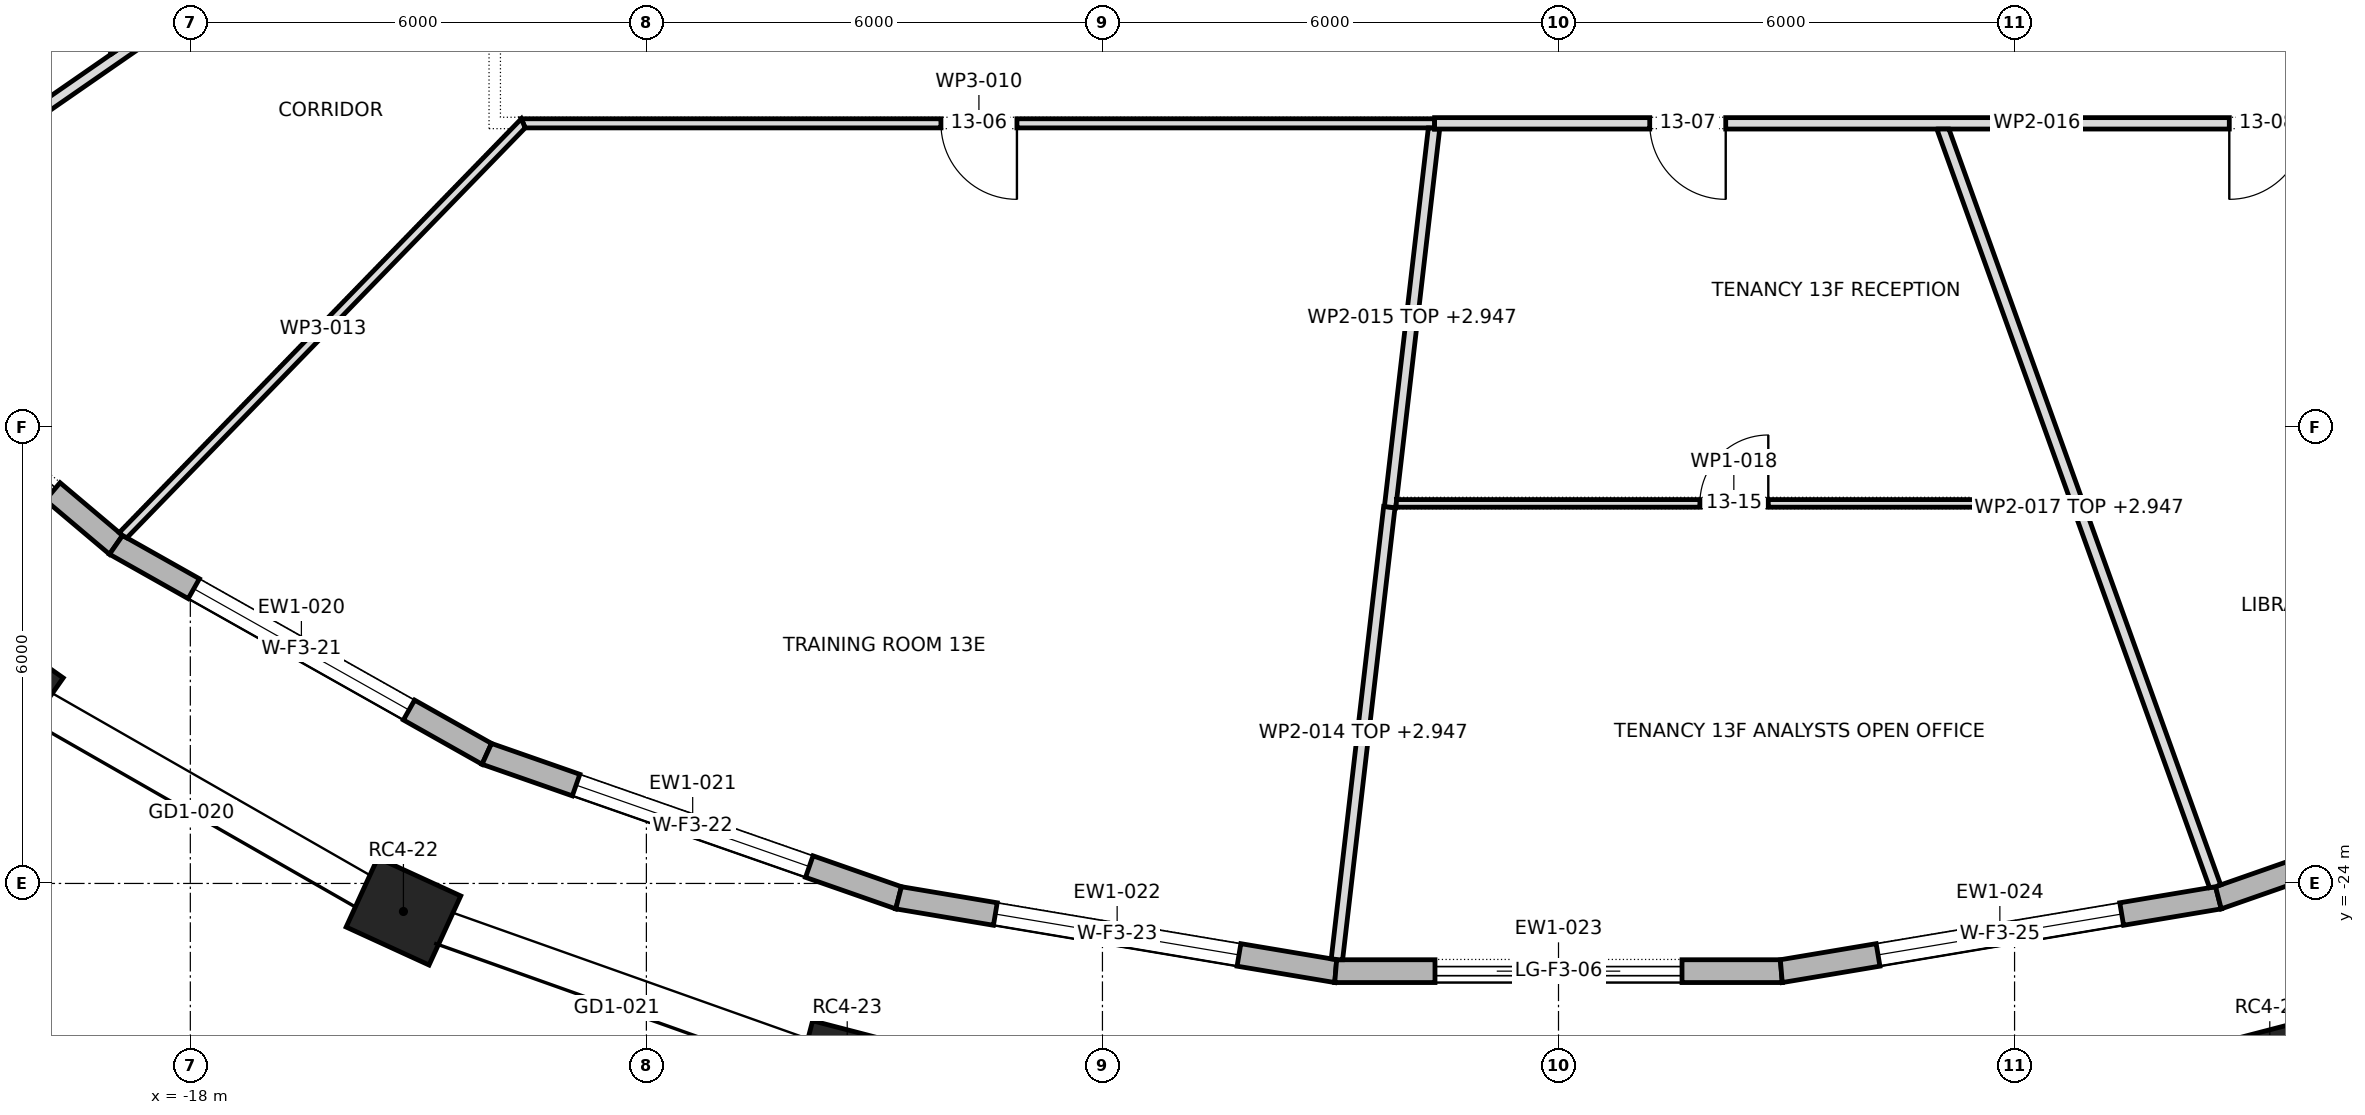
"""IFC4 building model, lengths in metres.
Left out: names, types, materials, properties, quantities, classifications, styles, units other than length and angle.
Written with IfcOpenShell. Run it as: python <this file> out.ifc"""

import sys

from ifc_helpers import new_model, si_unit, direction, frame, frame_2d, origin, origin_2d, place, context, subcontext, project, spatial, polyline, rectangle, outline, extrude, element, fill, save


model = new_model("IFC4")
c1 = context("Model", 3, precision=1e-05, world=origin(), true_north=direction((0.0, 1.0)))
c2 = subcontext(c1, "Body", "Model", "MODEL_VIEW")
j1 = project(units=[si_unit("LENGTHUNIT", "METRE"), si_unit("PLANEANGLEUNIT", "RADIAN")], contexts=[c1])
p1 = place(None, origin())
s1 = spatial("IfcSite", under=j1, at=p1, CompositionType="ELEMENT")
p2 = place(p1, origin())
s2 = spatial("IfcBuilding", under=s1, at=p2, CompositionType="ELEMENT")
p3 = place(p2, frame((0.0, 0.0, 198.9)))
s3 = spatial("IfcBuildingStorey", under=s2, at=p3, CompositionType="ELEMENT", Elevation=198.9)
for number, where, z_axis, x_axis in (
    (1, (-20.451, -21.359, 0.0), (0.0, 0.0, 1.0), (0.818, -0.575, 0.0)),
    (2, (-15.196, -24.369, 0.0), (0.0, 0.0, 1.0), (0.909, -0.417, 0.0)),
    (3, (-9.358, -26.442, 0.0), (0.0, 0.0, 1.0), (0.968, -0.252, 0.0)),
    (4, (9.358, -26.442, 0.0), (0.0, 0.0, 1.0), (0.968, 0.252, 0.0)),
):
    element("IfcColumn", number, at=place(p3, frame(where, z_axis=z_axis, x_axis=x_axis)), inside=s3, PredefinedType="COLUMN", context=c2, shape_type="SweptSolid", body=[
        extrude(rectangle(XDim=1.2, YDim=1.0, at=origin_2d()), origin(), (0.0, 0.0, 1.0), 4.0),
    ])
p4 = place(p3, frame((-23.128, -16.044, 0.0), z_axis=(0.0, 0.0, 1.0), x_axis=(0.764330261608, -0.644824977176, 0.0)))
e5 = element("IfcWall", 5, at=p4, inside=s3, PredefinedType="STANDARD", context=c2, shape_type="SweptSolid", body=[
    extrude(outline(polyline([(-0.015, -0.15), (5.444, -0.15), (5.416, 0.15), (0.015, 0.15), (-0.015, -0.15)])), origin(), (0.0, 0.0, 1.0), 3.7),
])
p5 = place(p4, frame((1.09, 0.0, 0.0)))
e6 = element("IfcOpeningElement", 6, at=p5, cuts=e5, PredefinedType="OPENING", context=c2, shape_type="SweptSolid", body=[
    extrude(rectangle(XDim=3.25, YDim=3.25, at=frame_2d((1.625, 1.625))), frame((0.0, 0.162, 0.0), z_axis=(0.0, -1.0, 0.0), x_axis=(1.0, 0.0, 0.0)), (0.0, 0.0, 1.0), 0.324),
])
p6 = place(p3, frame((-18.977, -19.545, 0.0), z_axis=(0.0, 0.0, 1.0), x_axis=(0.871083701819, -0.491134588912, 0.0)))
e7 = element("IfcWall", 7, at=p6, inside=s3, PredefinedType="STANDARD", context=c2, shape_type="SweptSolid", body=[
    extrude(outline(polyline([(-0.014, -0.15), (5.613, -0.15), (5.586, 0.15), (0.014, 0.15), (-0.014, -0.15)])), origin(), (0.0, 0.0, 1.0), 3.7),
])
p7 = place(p6, frame((1.175, 0.0, 0.6)))
e8 = element("IfcOpeningElement", 8, at=p7, cuts=e7, PredefinedType="OPENING", context=c2, shape_type="SweptSolid", body=[
    extrude(rectangle(XDim=3.25, YDim=2.65, at=frame_2d((1.625, 1.325))), frame((0.0, 0.162, 0.0), z_axis=(0.0, -1.0, 0.0), x_axis=(1.0, 0.0, 0.0)), (0.0, 0.0, 1.0), 0.324),
])
p8 = place(p3, frame((-14.1, -22.295, 0.0), z_axis=(0.0, 0.0, 1.0), x_axis=(0.944020060936, -0.329888048511, 0.0)))
e9 = element("IfcWall", 9, at=p8, inside=s3, PredefinedType="STANDARD", context=c2, shape_type="SweptSolid", body=[
    extrude(outline(polyline([(-0.013, -0.15), (5.752, -0.15), (5.727, 0.15), (0.013, 0.15), (-0.013, -0.15)])), origin(), (0.0, 0.0, 1.0), 3.7),
])
p9 = place(p8, frame((1.245, 0.0, 0.6)))
e10 = element("IfcOpeningElement", 10, at=p9, cuts=e9, PredefinedType="OPENING", context=c2, shape_type="SweptSolid", body=[
    extrude(rectangle(XDim=3.25, YDim=2.65, at=frame_2d((1.625, 1.325))), frame((0.0, 0.162, 0.0), z_axis=(0.0, -1.0, 0.0), x_axis=(1.0, 0.0, 0.0)), (0.0, 0.0, 1.0), 0.324),
])
p10 = place(p3, frame((-8.682, -24.189, 0.0), z_axis=(0.0, 0.0, 1.0), x_axis=(0.986207709048, -0.165512400181, 0.0)))
e11 = element("IfcWall", 11, at=p10, inside=s3, PredefinedType="STANDARD", context=c2, shape_type="SweptSolid", body=[
    extrude(outline(polyline([(-0.013, -0.15), (5.843, -0.15), (5.818, 0.15), (0.013, 0.15), (-0.013, -0.15)])), origin(), (0.0, 0.0, 1.0), 3.7),
])
p11 = place(p10, frame((1.291, 0.0, 0.6)))
e12 = element("IfcOpeningElement", 12, at=p11, cuts=e11, PredefinedType="OPENING", context=c2, shape_type="SweptSolid", body=[
    extrude(rectangle(XDim=3.25, YDim=2.65, at=frame_2d((1.625, 1.325))), frame((0.0, 0.162, 0.0), z_axis=(0.0, -1.0, 0.0), x_axis=(1.0, 0.0, 0.0)), (0.0, 0.0, 1.0), 0.324),
])
p12 = place(p3, frame((-2.931, -25.154, 0.0), z_axis=(0.0, 0.0, 1.0), x_axis=(1.0, 0.0, 0.0)))
e13 = element("IfcWall", 13, at=p12, inside=s3, PredefinedType="STANDARD", context=c2, shape_type="SweptSolid", body=[
    extrude(outline(polyline([(-0.012, -0.15), (5.875, -0.15), (5.85, 0.15), (0.012, 0.15), (-0.012, -0.15)])), origin(), (0.0, 0.0, 1.0), 3.7),
])
p13 = place(p12, frame((1.306, 0.0, 0.0)))
e14 = element("IfcOpeningElement", 14, at=p13, cuts=e13, PredefinedType="OPENING", context=c2, shape_type="SweptSolid", body=[
    extrude(rectangle(XDim=3.25, YDim=3.25, at=frame_2d((1.625, 1.625))), frame((0.0, 0.162, 0.0), z_axis=(0.0, -1.0, 0.0), x_axis=(1.0, 0.0, 0.0)), (0.0, 0.0, 1.0), 0.324),
])
p14 = place(p3, frame((2.931, -25.154, 0.0), z_axis=(0.0, 0.0, 1.0), x_axis=(0.986207709048, 0.165512400181, 0.0)))
e15 = element("IfcWall", 15, at=p14, inside=s3, PredefinedType="STANDARD", context=c2, shape_type="SweptSolid", body=[
    extrude(outline(polyline([(-0.012, -0.15), (5.844, -0.15), (5.818, 0.15), (0.012, 0.15), (-0.012, -0.15)])), origin(), (0.0, 0.0, 1.0), 3.7),
])
p15 = place(p14, frame((1.291, 0.0, 0.6)))
e16 = element("IfcOpeningElement", 16, at=p15, cuts=e15, PredefinedType="OPENING", context=c2, shape_type="SweptSolid", body=[
    extrude(rectangle(XDim=3.25, YDim=2.65, at=frame_2d((1.625, 1.325))), frame((0.0, 0.162, 0.0), z_axis=(0.0, -1.0, 0.0), x_axis=(1.0, 0.0, 0.0)), (0.0, 0.0, 1.0), 0.324),
])
p16 = place(p3, frame((8.682, -24.189, 0.0), z_axis=(0.0, 0.0, 1.0), x_axis=(0.944020060936, 0.329888048511, 0.0)))
e17 = element("IfcWall", 17, at=p16, inside=s3, PredefinedType="STANDARD", context=c2, shape_type="SweptSolid", body=[
    extrude(outline(polyline([(-0.013, -0.15), (5.753, -0.15), (5.726, 0.15), (0.013, 0.15), (-0.013, -0.15)])), origin(), (0.0, 0.0, 1.0), 3.7),
])
p17 = place(p16, frame((1.245, 0.0, 0.6)))
e18 = element("IfcOpeningElement", 18, at=p17, cuts=e17, PredefinedType="OPENING", context=c2, shape_type="SweptSolid", body=[
    extrude(rectangle(XDim=3.25, YDim=2.65, at=frame_2d((1.625, 1.325))), frame((0.0, 0.162, 0.0), z_axis=(0.0, -1.0, 0.0), x_axis=(1.0, 0.0, 0.0)), (0.0, 0.0, 1.0), 0.324),
])
p18 = place(p3, frame((-23.024, -15.94, 0.0), z_axis=(0.0, 0.0, 1.0), x_axis=(0.822097241007, 0.569347105313, 0.0)))
e19 = element("IfcWall", 19, at=p18, inside=s3, PredefinedType="PARTITIONING", context=c2, shape_type="SweptSolid", body=[
    extrude(outline(polyline([(0.024, -0.075), (1.856, -0.075), (3.688, -0.075), (5.52, -0.075), (7.352, -0.075), (9.184, -0.075), (11.016, -0.075), (10.977, -0.0), (10.938, 0.075), (8.961, 0.075), (6.985, 0.075), (5.008, 0.075), (5.006, 0.072), (5.002, 0.075), (3.335, 0.075), (1.667, 0.075), (0.0, 0.075), (0.0, 0.068), (0.005, -0.002), (0.024, -0.075)])), origin(), (0.0, 0.0, 1.0), 2.947),
])
p19 = place(p3, frame((-19.0, -13.095, 0.0), z_axis=(0.0, 0.0, 1.0), x_axis=(0.0, 1.0, 0.0)))
e20 = element("IfcWall", 20, at=p19, inside=s3, PredefinedType="PARTITIONING", context=c2, shape_type="SweptSolid", body=[
    extrude(outline(polyline([(8.169, -0.05), (8.169, -0.049), (8.144, 0.05), (6.515, 0.05), (4.886, 0.05), (3.258, 0.05), (1.629, 0.05), (0.0, 0.05), (0.0, 0.049), (0.069, -0.05), (1.689, -0.05), (3.309, -0.05), (4.929, -0.05), (6.549, -0.05), (8.169, -0.05)])), origin(), (0.0, 0.0, 1.0), 3.7),
])
p20 = place(p19, frame((3.64, 0.0, 0.0)))
e21 = element("IfcOpeningElement", 21, at=p20, cuts=e20, PredefinedType="OPENING", context=c2, shape_type="SweptSolid", body=[
    extrude(rectangle(XDim=0.9, YDim=2.1, at=frame_2d((0.45, 1.05))), frame((0.0, 0.062, 0.0), z_axis=(0.0, -1.0, 0.0), x_axis=(1.0, 0.0, 0.0)), (0.0, 0.0, 1.0), 0.124),
])
p21 = place(p3, frame((-13.646, -14.0, 0.0), z_axis=(0.0, 0.0, 1.0), x_axis=(1.0, 0.0, 0.0)))
e22 = element("IfcWall", 22, at=p21, inside=s3, PredefinedType="PARTITIONING", context=c2, shape_type="SweptSolid", body=[
    extrude(outline(polyline([(12.016, 0.06), (10.299, 0.06), (8.583, 0.06), (6.866, 0.06), (5.15, 0.06), (3.433, 0.06), (1.717, 0.06), (0.0, 0.06), (0.051, -0.06), (2.045, -0.06), (4.039, -0.06), (6.033, -0.06), (8.027, -0.06), (10.021, -0.06), (12.016, -0.06), (12.016, 0.06)])), origin(), (0.0, 0.0, 1.0), 3.7),
])
p22 = place(p21, frame((5.521, 0.0, 0.0)))
e23 = element("IfcOpeningElement", 23, at=p22, cuts=e22, PredefinedType="OPENING", context=c2, shape_type="SweptSolid", body=[
    extrude(rectangle(XDim=1.0, YDim=2.1, at=frame_2d((0.5, 1.05))), frame((0.0, 0.072, 0.0), z_axis=(0.0, -1.0, 0.0), x_axis=(1.0, 0.0, 0.0)), (0.0, 0.0, 1.0), 0.144),
])
p23 = place(p3, frame((-13.602, -13.982, 0.0), z_axis=(0.0, 0.0, 1.0), x_axis=(-0.69685470262, -0.717212328001, 0.0)))
e24 = element("IfcWall", 24, at=p23, inside=s3, PredefinedType="PARTITIONING", context=c2, shape_type="SweptSolid", body=[
    extrude(outline(polyline([(7.591, -0.06), (7.591, -0.058), (7.587, -0.003), (7.571, 0.06), (5.691, 0.06), (3.811, 0.06), (1.931, 0.06), (0.051, 0.06), (0.025, 0.0), (0.0, -0.06), (0.0, -0.06), (0.0, -0.06), (1.898, -0.06), (3.796, -0.06), (5.694, -0.06), (7.591, -0.06)])), origin(), (0.0, 0.0, 1.0), 3.7),
])
p24 = place(p3, frame((-2.915, -25.0, 0.0), z_axis=(0.0, 0.0, 1.0), x_axis=(0.115112831027, 0.993352422926, 0.0)))
e25 = element("IfcWall", 25, at=p24, inside=s3, PredefinedType="PARTITIONING", context=c2, shape_type="SweptSolid", body=[
    extrude(outline(polyline([(0.0, 0.075), (0.0, -0.031), (0.005, -0.075), (2.0, -0.075), (3.996, -0.075), (5.991, -0.075), (5.991, 0.075), (3.994, 0.075), (1.997, 0.075), (0.0, 0.075)])), origin(), (0.0, 0.0, 1.0), 2.947),
])
p25 = place(p3, frame((-2.216, -19.05, 0.0), z_axis=(0.0, 0.0, 1.0), x_axis=(0.11524289965, 0.993337341531, 0.0)))
e26 = element("IfcWall", 26, at=p25, inside=s3, PredefinedType="PARTITIONING", context=c2, shape_type="SweptSolid", body=[
    extrude(outline(polyline([(0.0, -0.075), (0.099, -0.075), (0.109, -0.074), (0.109, -0.075), (1.745, -0.075), (3.381, -0.075), (5.017, -0.075), (5.017, -0.073), (5.009, -0.009), (5.017, -0.008), (5.017, 0.058), (5.015, 0.075), (3.343, 0.075), (1.672, 0.075), (0.0, 0.075), (0.0, -0.065), (0.0, -0.065), (0.0, -0.075)])), origin(), (0.0, 0.0, 1.0), 2.947),
])
p26 = place(p3, frame((-1.63, -14.0, 0.0), z_axis=(0.0, 0.0, 1.0), x_axis=(1.0, 0.0, 0.0)))
e27 = element("IfcWall", 27, at=p26, inside=s3, PredefinedType="PARTITIONING", context=c2, shape_type="SweptSolid", body=[
    extrude(outline(polyline([(0.0, -0.075), (1.902, -0.075), (3.804, -0.075), (5.707, -0.075), (7.609, -0.075), (9.511, -0.075), (11.414, -0.075), (13.316, -0.075), (15.218, -0.075), (15.281, 0.075), (15.281, 0.075), (13.371, 0.075), (11.461, 0.075), (9.551, 0.075), (7.641, 0.075), (5.73, 0.075), (3.82, 0.075), (1.91, 0.075), (0.0, 0.075), (0.0, -0.075)])), origin(), (0.0, 0.0, 1.0), 3.7),
])
p27 = place(p26, frame((2.83, 0.0, 0.0)))
e28 = element("IfcOpeningElement", 28, at=p27, cuts=e27, PredefinedType="OPENING", context=c2, shape_type="SweptSolid", body=[
    extrude(rectangle(XDim=1.0, YDim=2.1, at=frame_2d((0.5, 1.05))), frame((0.0, 0.087, 0.0), z_axis=(0.0, -1.0, 0.0), x_axis=(1.0, 0.0, 0.0)), (0.0, 0.0, 1.0), 0.174),
])
p28 = place(p26, frame((10.455, 0.0, 0.0)))
e29 = element("IfcOpeningElement", 29, at=p28, cuts=e27, PredefinedType="OPENING", context=c2, shape_type="SweptSolid", body=[
    extrude(rectangle(XDim=1.0, YDim=2.1, at=frame_2d((0.5, 1.05))), frame((0.0, 0.087, 0.0), z_axis=(0.0, -1.0, 0.0), x_axis=(1.0, 0.0, 0.0)), (0.0, 0.0, 1.0), 0.174),
])
p29 = place(p3, frame((5.048, -14.05, 0.0), z_axis=(0.0, 0.0, 1.0), x_axis=(0.338318960249, -0.941031498482, 0.0)))
e30 = element("IfcWall", 30, at=p29, inside=s3, PredefinedType="PARTITIONING", context=c2, shape_type="SweptSolid", body=[
    extrude(outline(polyline([(0.0, -0.075), (1.727, -0.075), (3.454, -0.075), (5.18, -0.075), (5.181, -0.073), (5.188, -0.075), (6.994, -0.075), (8.8, -0.075), (10.606, -0.075), (10.621, 0.004), (10.621, 0.032), (10.621, 0.075), (8.86, 0.075), (7.098, 0.075), (5.337, 0.075), (3.576, 0.075), (1.815, 0.075), (0.054, 0.075), (0.0, -0.074), (0.0, -0.075)])), origin(), (0.0, 0.0, 1.0), 2.947),
])
p30 = place(p3, frame((6.765, -19.0, 0.0), z_axis=(0.0, 0.0, 1.0), x_axis=(-1.0, 0.0, 0.0)))
e31 = element("IfcWall", 31, at=p30, inside=s3, PredefinedType="PARTITIONING", context=c2, shape_type="SweptSolid", body=[
    extrude(outline(polyline([(0.035, -0.05), (1.807, -0.05), (3.579, -0.05), (5.351, -0.05), (7.122, -0.05), (8.894, -0.05), (8.905, 0.046), (8.905, 0.05), (7.124, 0.05), (5.343, 0.05), (3.562, 0.05), (1.781, 0.05), (0.0, 0.05), (0.0, 0.049), (0.035, -0.05)])), origin(), (0.0, 0.0, 1.0), 3.7),
])
p31 = place(p30, frame((4.006, 0.0, 0.0)))
e32 = element("IfcOpeningElement", 32, at=p31, cuts=e31, PredefinedType="OPENING", context=c2, shape_type="SweptSolid", body=[
    extrude(rectangle(XDim=0.9, YDim=2.1, at=frame_2d((0.45, 1.05))), frame((0.0, 0.062, 0.0), z_axis=(0.0, -1.0, 0.0), x_axis=(1.0, 0.0, 0.0)), (0.0, 0.0, 1.0), 0.124),
])
p32 = place(p5, origin())
e33 = element("IfcDoor", 33, at=p32, inside=s3, OperationType="DOUBLE_DOOR_SLIDING", PredefinedType="DOOR", context=c2, shape_type="SweptSolid", body=[
    extrude(rectangle(XDim=3.25, YDim=3.25, at=frame_2d((1.625, 1.625))), frame((0.0, 0.025, 0.0), z_axis=(0.0, -1.0, 0.0), x_axis=(1.0, 0.0, 0.0)), (0.0, 0.0, 1.0), 0.05),
])
fill(e6, e33)
p33 = place(p7, origin())
e34 = element("IfcWindow", 34, at=p33, inside=s3, PartitioningType="TRIPLE_PANEL_VERTICAL", PredefinedType="WINDOW", context=c2, shape_type="SweptSolid", body=[
    extrude(rectangle(XDim=3.25, YDim=2.65, at=frame_2d((1.625, 1.325))), frame((0.0, 0.03, 0.0), z_axis=(0.0, -1.0, 0.0), x_axis=(1.0, 0.0, 0.0)), (0.0, 0.0, 1.0), 0.06),
])
fill(e8, e34)
p34 = place(p9, origin())
e35 = element("IfcWindow", 35, at=p34, inside=s3, PartitioningType="TRIPLE_PANEL_VERTICAL", PredefinedType="WINDOW", context=c2, shape_type="SweptSolid", body=[
    extrude(rectangle(XDim=3.25, YDim=2.65, at=frame_2d((1.625, 1.325))), frame((0.0, 0.03, 0.0), z_axis=(0.0, -1.0, 0.0), x_axis=(1.0, 0.0, 0.0)), (0.0, 0.0, 1.0), 0.06),
])
fill(e10, e35)
p35 = place(p11, origin())
e36 = element("IfcWindow", 36, at=p35, inside=s3, PartitioningType="TRIPLE_PANEL_VERTICAL", PredefinedType="WINDOW", context=c2, shape_type="SweptSolid", body=[
    extrude(rectangle(XDim=3.25, YDim=2.65, at=frame_2d((1.625, 1.325))), frame((0.0, 0.03, 0.0), z_axis=(0.0, -1.0, 0.0), x_axis=(1.0, 0.0, 0.0)), (0.0, 0.0, 1.0), 0.06),
])
fill(e12, e36)
p36 = place(p13, origin())
e37 = element("IfcDoor", 37, at=p36, inside=s3, OperationType="DOUBLE_DOOR_SLIDING", PredefinedType="DOOR", context=c2, shape_type="SweptSolid", body=[
    extrude(rectangle(XDim=3.25, YDim=3.25, at=frame_2d((1.625, 1.625))), frame((0.0, 0.025, 0.0), z_axis=(0.0, -1.0, 0.0), x_axis=(1.0, 0.0, 0.0)), (0.0, 0.0, 1.0), 0.05),
])
fill(e14, e37)
p37 = place(p15, origin())
e38 = element("IfcWindow", 38, at=p37, inside=s3, PartitioningType="TRIPLE_PANEL_VERTICAL", PredefinedType="WINDOW", context=c2, shape_type="SweptSolid", body=[
    extrude(rectangle(XDim=3.25, YDim=2.65, at=frame_2d((1.625, 1.325))), frame((0.0, 0.03, 0.0), z_axis=(0.0, -1.0, 0.0), x_axis=(1.0, 0.0, 0.0)), (0.0, 0.0, 1.0), 0.06),
])
fill(e16, e38)
p38 = place(p22, frame((1.0, 0.0, 0.0), z_axis=(0.0, 0.0, 1.0), x_axis=(-1.0, 0.0, 0.0)))
e39 = element("IfcDoor", 39, at=p38, inside=s3, OperationType="SINGLE_SWING_RIGHT", PredefinedType="DOOR", context=c2, shape_type="SweptSolid", body=[
    extrude(rectangle(XDim=1.0, YDim=2.1, at=frame_2d((0.5, 1.05))), frame((0.0, 0.025, 0.0), z_axis=(0.0, -1.0, 0.0), x_axis=(1.0, 0.0, 0.0)), (0.0, 0.0, 1.0), 0.05),
])
fill(e23, e39)
p39 = place(p27, frame((1.0, 0.0, 0.0), z_axis=(0.0, 0.0, 1.0), x_axis=(-1.0, 0.0, 0.0)))
e40 = element("IfcDoor", 40, at=p39, inside=s3, OperationType="SINGLE_SWING_RIGHT", PredefinedType="DOOR", context=c2, shape_type="SweptSolid", body=[
    extrude(rectangle(XDim=1.0, YDim=2.1, at=frame_2d((0.5, 1.05))), frame((0.0, 0.025, 0.0), z_axis=(0.0, -1.0, 0.0), x_axis=(1.0, 0.0, 0.0)), (0.0, 0.0, 1.0), 0.05),
])
fill(e28, e40)
p40 = place(p28, frame((1.0, 0.0, 0.0), z_axis=(0.0, 0.0, 1.0), x_axis=(-1.0, 0.0, 0.0)))
e41 = element("IfcDoor", 41, at=p40, inside=s3, OperationType="SINGLE_SWING_LEFT", PredefinedType="DOOR", context=c2, shape_type="SweptSolid", body=[
    extrude(rectangle(XDim=1.0, YDim=2.1, at=frame_2d((0.5, 1.05))), frame((0.0, 0.025, 0.0), z_axis=(0.0, -1.0, 0.0), x_axis=(1.0, 0.0, 0.0)), (0.0, 0.0, 1.0), 0.05),
])
fill(e29, e41)
p41 = place(p31, frame((0.9, 0.0, 0.0), z_axis=(0.0, 0.0, 1.0), x_axis=(-1.0, 0.0, 0.0)))
e42 = element("IfcDoor", 42, at=p41, inside=s3, OperationType="SINGLE_SWING_LEFT", PredefinedType="DOOR", context=c2, shape_type="SweptSolid", body=[
    extrude(rectangle(XDim=0.9, YDim=2.1, at=frame_2d((0.45, 1.05))), frame((0.0, 0.025, 0.0), z_axis=(0.0, -1.0, 0.0), x_axis=(1.0, 0.0, 0.0)), (0.0, 0.0, 1.0), 0.05),
])
fill(e32, e42)
save(model, sys.argv[1])
